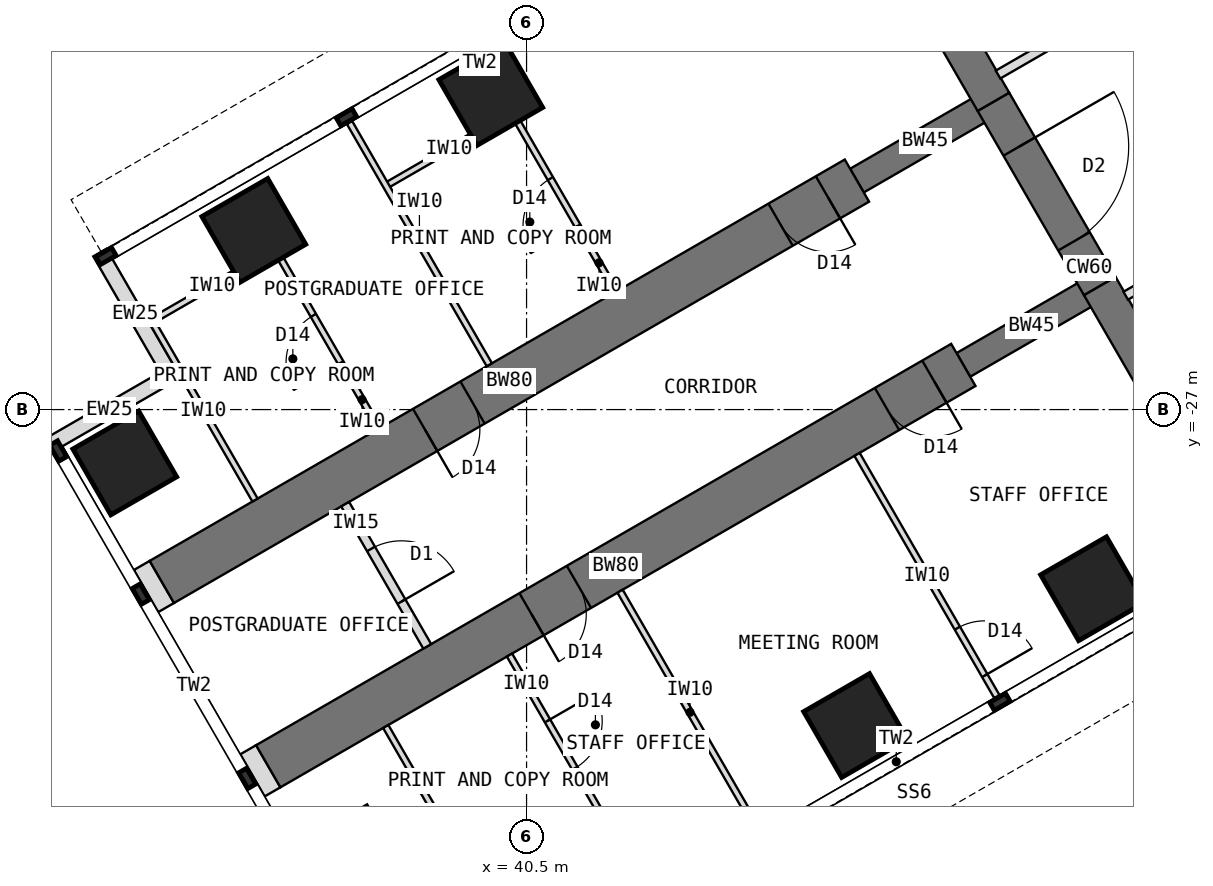
"""IFC4 building model, lengths in metres.
Left out: names, types, materials, properties, quantities, classifications, styles, units other than length and angle.
Written with IfcOpenShell. Run it as: python <this file> out.ifc"""

import sys

from ifc_helpers import new_model, si_unit, direction, frame, frame_2d, origin, origin_2d, place, context, subcontext, project, spatial, rectangle, extrude, element, fill, save


model = new_model("IFC4")
c1 = context("Model", 3, precision=1e-05, world=origin(), true_north=direction((0.0, 1.0)))
c2 = subcontext(c1, "Body", "Model", "MODEL_VIEW")
j1 = project(units=[si_unit("LENGTHUNIT", "METRE"), si_unit("PLANEANGLEUNIT", "RADIAN")], contexts=[c1])
p1 = place(None, origin())
s1 = spatial("IfcSite", under=j1, at=p1, CompositionType="ELEMENT")
p2 = place(p1, origin())
s2 = spatial("IfcBuilding", under=s1, at=p2, CompositionType="ELEMENT")
p3 = place(p2, frame((0.0, 0.0, 157.5)))
s3 = spatial("IfcBuildingStorey", under=s2, at=p3, CompositionType="ELEMENT", Elevation=157.5)
p4 = place(p3, frame((45.904, -18.0, 0.0), z_axis=(0.0, 0.0, 1.0), x_axis=(0.500024481964, -0.866011268655, 0.0)))
e1 = element("IfcWall", 1, at=p4, inside=s3, PredefinedType="SHEAR", context=c2, shape_type="SweptSolid", body=[
    extrude(rectangle(XDim=4.548, YDim=0.6, at=frame_2d((2.274, 0.0))), origin(), (0.0, 0.0, 1.0), 4.0),
])
p5 = place(p3, frame((48.178, -21.939, 0.0), z_axis=(0.0, 0.0, 1.0), x_axis=(0.500010275428, -0.866019471182, 0.0)))
e2 = element("IfcWall", 2, at=p5, inside=s3, PredefinedType="SHEAR", context=c2, shape_type="SweptSolid", body=[
    extrude(rectangle(XDim=3.5, YDim=0.6, at=frame_2d((1.75, 0.0))), origin(), (0.0, 0.0, 1.0), 4.0),
])
p6 = place(p5, frame((0.85, 0.0, 0.0)))
e3 = element("IfcOpeningElement", 3, at=p6, cuts=e2, PredefinedType="OPENING", context=c2, shape_type="SweptSolid", body=[
    extrude(rectangle(XDim=1.8, YDim=2.1, at=frame_2d((0.9, 1.05))), frame((0.0, 0.31, 0.0), z_axis=(0.0, -1.0, 0.0), x_axis=(1.0, 0.0, 0.0)), (0.0, 0.0, 1.0), 0.62),
])
p7 = place(p3, frame((49.928, -24.97, 0.0), z_axis=(0.0, 0.0, 1.0), x_axis=(0.499984222037, -0.866034513004, 0.0)))
e4 = element("IfcWall", 4, at=p7, inside=s3, PredefinedType="SHEAR", context=c2, shape_type="SweptSolid", body=[
    extrude(rectangle(XDim=4.548, YDim=0.6, at=frame_2d((2.274, 0.0))), origin(), (0.0, 0.0, 1.0), 4.0),
])
p8 = place(p3, frame((49.928, -24.97, 0.0), z_axis=(0.0, 0.0, 1.0), x_axis=(-0.866031863473, -0.499988811324, 0.0)))
e5 = element("IfcWall", 5, at=p8, inside=s3, PredefinedType="SHEAR", context=c2, shape_type="SweptSolid", body=[
    extrude(rectangle(XDim=2.592, YDim=0.45, at=frame_2d((1.296, 0.0))), origin(), (0.0, 0.0, 1.0), 4.0),
])
p9 = place(p3, frame((47.684, -26.266, 0.0), z_axis=(0.0, 0.0, 1.0), x_axis=(-0.866027579429, -0.499996231654, 0.0)))
e6 = element("IfcWall", 6, at=p9, inside=s3, PredefinedType="SHEAR", context=c2, shape_type="SweptSolid", body=[
    extrude(rectangle(XDim=13.2, YDim=0.8, at=frame_2d((6.6, 0.0))), origin(), (0.0, 0.0, 1.0), 4.0),
])
p10 = place(p9, frame((0.55, 0.0, 0.0)))
e7 = element("IfcOpeningElement", 7, at=p10, cuts=e6, PredefinedType="OPENING", context=c2, shape_type="SweptSolid", body=[
    extrude(rectangle(XDim=0.9, YDim=2.1, at=frame_2d((0.45, 1.05))), frame((0.0, 0.41, 0.0), z_axis=(0.0, -1.0, 0.0), x_axis=(1.0, 0.0, 0.0)), (0.0, 0.0, 1.0), 0.82),
])
p11 = place(p9, frame((7.3, 0.0, 0.0)))
e8 = element("IfcOpeningElement", 8, at=p11, cuts=e6, PredefinedType="OPENING", context=c2, shape_type="SweptSolid", body=[
    extrude(rectangle(XDim=0.9, YDim=2.1, at=frame_2d((0.45, 1.05))), frame((0.0, 0.41, 0.0), z_axis=(0.0, -1.0, 0.0), x_axis=(1.0, 0.0, 0.0)), (0.0, 0.0, 1.0), 0.82),
])
p12 = place(p3, frame((48.178, -21.939, 0.0), z_axis=(0.0, 0.0, 1.0), x_axis=(-0.866072649678, -0.499918158782, 0.0)))
e9 = element("IfcWall", 9, at=p12, inside=s3, PredefinedType="SHEAR", context=c2, shape_type="SweptSolid", body=[
    extrude(rectangle(XDim=2.592, YDim=0.45, at=frame_2d((1.296, 0.0))), origin(), (0.0, 0.0, 1.0), 4.0),
])
p13 = place(p3, frame((45.934, -23.234, 0.0), z_axis=(0.0, 0.0, 1.0), x_axis=(-0.866019570528, -0.500010103361, 0.0)))
e10 = element("IfcWall", 10, at=p13, inside=s3, PredefinedType="SHEAR", context=c2, shape_type="SweptSolid", body=[
    extrude(rectangle(XDim=13.2, YDim=0.8, at=frame_2d((6.6, 0.0))), origin(), (0.0, 0.0, 1.0), 4.0),
])
p14 = place(p13, frame((0.55, 0.0, 0.0)))
e11 = element("IfcOpeningElement", 11, at=p14, cuts=e10, PredefinedType="OPENING", context=c2, shape_type="SweptSolid", body=[
    extrude(rectangle(XDim=0.9, YDim=2.1, at=frame_2d((0.45, 1.05))), frame((0.0, 0.41, 0.0), z_axis=(0.0, -1.0, 0.0), x_axis=(1.0, 0.0, 0.0)), (0.0, 0.0, 1.0), 0.82),
])
p15 = place(p13, frame((7.3, 0.0, 0.0)))
e12 = element("IfcOpeningElement", 12, at=p15, cuts=e10, PredefinedType="OPENING", context=c2, shape_type="SweptSolid", body=[
    extrude(rectangle(XDim=0.9, YDim=2.1, at=frame_2d((0.45, 1.05))), frame((0.0, 0.41, 0.0), z_axis=(0.0, -1.0, 0.0), x_axis=(1.0, 0.0, 0.0)), (0.0, 0.0, 1.0), 0.82),
])
for number, where, z_axis, x_axis in (
    (13, (49.809, -29.946, 0.0), (0.0, 0.0, 1.0), (0.866, 0.5, 0.0)),
    (14, (45.912, -32.196, 0.0), (0.0, 0.0, 1.0), (0.866, 0.5, 0.0)),
    (15, (39.912, -21.804, 0.0), (0.0, 0.0, 1.0), (0.866, 0.5, 0.0)),
    (16, (36.014, -24.054, 0.0), (0.0, 0.0, 1.0), (0.866, 0.5, 0.0)),
    (17, (37.642, -34.373, 0.0), (0.0, 0.0, 1.0), (0.866, 0.5, 0.0)),
    (18, (33.892, -27.877, 0.0), (0.0, 0.0, 1.0), (0.866, 0.5, 0.0)),
):
    element("IfcColumn", number, at=place(p3, frame(where, z_axis=z_axis, x_axis=x_axis)), inside=s3, PredefinedType="COLUMN", context=c2, shape_type="SweptSolid", body=[
        extrude(rectangle(XDim=1.25, YDim=1.25, at=origin_2d()), origin(), (0.0, 0.0, 1.0), 4.0),
    ])
for number, where, z_axis, x_axis in (
    (19, (33.483, -24.419, 0.0), (0.0, 0.0, 1.0), (0.5, -0.866, 0.0)),
    (20, (34.645, -26.432, 0.0), (0.0, 0.0, 1.0), (-0.866, -0.5, 0.0)),
):
    element("IfcWall", number, at=place(p3, frame(where, z_axis=z_axis, x_axis=x_axis)), inside=s3, PredefinedType="STANDARD", context=c2, shape_type="SweptSolid", body=[
        extrude(rectangle(XDim=2.325, YDim=0.25, at=frame_2d((1.163, 0.0))), origin(), (0.0, 0.0, 1.0), 3.8),
    ])
p16 = place(p3, frame((36.252, -32.865, 0.0), z_axis=(0.0, 0.0, 1.0), x_axis=(-0.865778900179, -0.500426713919, 0.0)))
e21 = element("IfcWall", 21, at=p16, inside=s3, PredefinedType="PARTITIONING", context=c2, shape_type="SweptSolid", body=[
    extrude(rectangle(XDim=0.3, YDim=0.8, at=frame_2d((0.15, 0.0))), origin(), (0.0, 0.0, 1.0), 3.8),
])
p17 = place(p3, frame((34.502, -29.834, 0.0), z_axis=(0.0, 0.0, 1.0), x_axis=(-0.866131372301, -0.499816412211, 0.0)))
e22 = element("IfcWall", 22, at=p17, inside=s3, PredefinedType="PARTITIONING", context=c2, shape_type="SweptSolid", body=[
    extrude(rectangle(XDim=0.3, YDim=0.8, at=frame_2d((0.15, 0.0))), origin(), (0.0, 0.0, 1.0), 3.8),
])
p18 = place(p3, frame((45.935, -27.737, 0.0), z_axis=(0.0, 0.0, 1.0), x_axis=(0.500014953309, -0.866016770315, 0.0)))
e23 = element("IfcWall", 23, at=p18, inside=s3, PredefinedType="PARTITIONING", context=c2, shape_type="SweptSolid", body=[
    extrude(rectangle(XDim=4.6, YDim=0.1, at=frame_2d((2.3, 0.0))), origin(), (0.0, 0.0, 1.0), 3.8),
])
p19 = place(p18, frame((3.3, 0.0, 0.0)))
e24 = element("IfcOpeningElement", 24, at=p19, cuts=e23, PredefinedType="OPENING", context=c2, shape_type="SweptSolid", body=[
    extrude(rectangle(XDim=0.9, YDim=2.1, at=frame_2d((0.45, 1.05))), frame((0.0, 0.06, 0.0), z_axis=(0.0, -1.0, 0.0), x_axis=(1.0, 0.0, 0.0)), (0.0, 0.0, 1.0), 0.12),
])
p20 = place(p3, frame((42.038, -29.987, 0.0), z_axis=(0.0, 0.0, 1.0), x_axis=(0.499975146636, -0.866039752405, 0.0)))
e25 = element("IfcWall", 25, at=p20, inside=s3, PredefinedType="PARTITIONING", context=c2, shape_type="SweptSolid", body=[
    extrude(rectangle(XDim=4.6, YDim=0.1, at=frame_2d((2.3, 0.0))), origin(), (0.0, 0.0, 1.0), 3.8),
])
p21 = place(p3, frame((40.219, -31.037, 0.0), z_axis=(0.0, 0.0, 1.0), x_axis=(0.500031147688, -0.866007419912, 0.0)))
e26 = element("IfcWall", 26, at=p21, inside=s3, PredefinedType="PARTITIONING", context=c2, shape_type="SweptSolid", body=[
    extrude(rectangle(XDim=3.4, YDim=0.1, at=frame_2d((1.7, 0.0))), origin(), (0.0, 0.0, 1.0), 3.8),
])
p22 = place(p21, frame((1.25, 0.0, 0.0)))
e27 = element("IfcOpeningElement", 27, at=p22, cuts=e26, PredefinedType="OPENING", context=c2, shape_type="SweptSolid", body=[
    extrude(rectangle(XDim=0.9, YDim=2.1, at=frame_2d((0.45, 1.05))), frame((0.0, 0.06, 0.0), z_axis=(0.0, -1.0, 0.0), x_axis=(1.0, 0.0, 0.0)), (0.0, 0.0, 1.0), 0.12),
])
p23 = place(p3, frame((38.184, -32.212, 0.0), z_axis=(0.0, 0.0, 1.0), x_axis=(0.500031147688, -0.866007419912, 0.0)))
e28 = element("IfcWall", 28, at=p23, inside=s3, PredefinedType="PARTITIONING", context=c2, shape_type="SweptSolid", body=[
    extrude(rectangle(XDim=3.4, YDim=0.1, at=frame_2d((1.7, 0.0))), origin(), (0.0, 0.0, 1.0), 3.8),
])
p24 = place(p3, frame((39.888, -26.263, 0.0), z_axis=(0.0, 0.0, 1.0), x_axis=(-0.500014953309, 0.866016770315, 0.0)))
e29 = element("IfcWall", 29, at=p24, inside=s3, PredefinedType="PARTITIONING", context=c2, shape_type="SweptSolid", body=[
    extrude(rectangle(XDim=4.6, YDim=0.1, at=frame_2d((2.3, 0.0))), origin(), (0.0, 0.0, 1.0), 3.8),
])
p25 = place(p3, frame((40.266, -22.119, 0.0), z_axis=(0.0, 0.0, 1.0), x_axis=(-0.866024647952, -0.500001309137, 0.0)))
e30 = element("IfcWall", 30, at=p25, inside=s3, PredefinedType="PARTITIONING", context=c2, shape_type="SweptSolid", body=[
    extrude(rectangle(XDim=2.4, YDim=0.1, at=frame_2d((1.2, 0.0))), origin(), (0.0, 0.0, 1.0), 3.8),
])
p26 = place(p3, frame((41.967, -25.063, 0.0), z_axis=(0.0, 0.0, 1.0), x_axis=(-0.500062241894, 0.865989465428, 0.0)))
e31 = element("IfcWall", 31, at=p26, inside=s3, PredefinedType="PARTITIONING", context=c2, shape_type="SweptSolid", body=[
    extrude(rectangle(XDim=3.4, YDim=0.1, at=frame_2d((1.7, 0.0))), origin(), (0.0, 0.0, 1.0), 3.8),
])
p27 = place(p26, frame((1.25, 0.0, 0.0)))
e32 = element("IfcOpeningElement", 32, at=p27, cuts=e31, PredefinedType="OPENING", context=c2, shape_type="SweptSolid", body=[
    extrude(rectangle(XDim=0.9, YDim=2.1, at=frame_2d((0.45, 1.05))), frame((0.0, 0.06, 0.0), z_axis=(0.0, -1.0, 0.0), x_axis=(1.0, 0.0, 0.0)), (0.0, 0.0, 1.0), 0.12),
])
p28 = place(p3, frame((36.369, -24.369, 0.0), z_axis=(0.0, 0.0, 1.0), x_axis=(-0.866050077142, -0.499957262057, 0.0)))
e33 = element("IfcWall", 33, at=p28, inside=s3, PredefinedType="PARTITIONING", context=c2, shape_type="SweptSolid", body=[
    extrude(rectangle(XDim=2.4, YDim=0.1, at=frame_2d((1.2, 0.0))), origin(), (0.0, 0.0, 1.0), 3.8),
])
p29 = place(p3, frame((38.069, -27.313, 0.0), z_axis=(0.0, 0.0, 1.0), x_axis=(-0.500008388397, 0.866020560687, 0.0)))
e34 = element("IfcWall", 34, at=p29, inside=s3, PredefinedType="PARTITIONING", context=c2, shape_type="SweptSolid", body=[
    extrude(rectangle(XDim=3.4, YDim=0.1, at=frame_2d((1.7, 0.0))), origin(), (0.0, 0.0, 1.0), 3.8),
])
p30 = place(p29, frame((1.25, 0.0, 0.0)))
e35 = element("IfcOpeningElement", 35, at=p30, cuts=e34, PredefinedType="OPENING", context=c2, shape_type="SweptSolid", body=[
    extrude(rectangle(XDim=0.9, YDim=2.1, at=frame_2d((0.45, 1.05))), frame((0.0, 0.06, 0.0), z_axis=(0.0, -1.0, 0.0), x_axis=(1.0, 0.0, 0.0)), (0.0, 0.0, 1.0), 0.12),
])
p31 = place(p3, frame((36.034, -28.488, 0.0), z_axis=(0.0, 0.0, 1.0), x_axis=(-0.499977295307, 0.866038511948, 0.0)))
e36 = element("IfcWall", 36, at=p31, inside=s3, PredefinedType="PARTITIONING", context=c2, shape_type="SweptSolid", body=[
    extrude(rectangle(XDim=3.4, YDim=0.1, at=frame_2d((1.7, 0.0))), origin(), (0.0, 0.0, 1.0), 3.8),
])
p32 = place(p3, frame((48.254, -21.49, 0.0), z_axis=(0.0, 0.0, 1.0), x_axis=(0.866025707867, 0.499999473313, 0.0)))
e37 = element("IfcWall", 37, at=p32, inside=s3, PredefinedType="PARTITIONING", context=c2, shape_type="SweptSolid", body=[
    extrude(rectangle(XDim=4.476, YDim=0.15, at=frame_2d((2.238, 0.0))), origin(), (0.0, 0.0, 1.0), 3.8),
])
p33 = place(p32, frame((2.633, 0.0, 0.0)))
e38 = element("IfcOpeningElement", 38, at=p33, cuts=e37, PredefinedType="OPENING", context=c2, shape_type="SweptSolid", body=[
    extrude(rectangle(XDim=1.0, YDim=2.1, at=frame_2d((0.5, 1.05))), frame((0.0, 0.085, 0.0), z_axis=(0.0, -1.0, 0.0), x_axis=(1.0, 0.0, 0.0)), (0.0, 0.0, 1.0), 0.17),
])
p34 = place(p3, frame((54.23, -22.89, 0.0), z_axis=(0.0, 0.0, 1.0), x_axis=(-0.866025707867, -0.499999473313, 0.0)))
e39 = element("IfcWall", 39, at=p34, inside=s3, PredefinedType="PARTITIONING", context=c2, shape_type="SweptSolid", body=[
    extrude(rectangle(XDim=4.476, YDim=0.15, at=frame_2d((2.238, 0.0))), origin(), (0.0, 0.0, 1.0), 3.8),
])
p35 = place(p34, frame((0.843, 0.0, 0.0)))
e40 = element("IfcOpeningElement", 40, at=p35, cuts=e39, PredefinedType="OPENING", context=c2, shape_type="SweptSolid", body=[
    extrude(rectangle(XDim=1.0, YDim=2.1, at=frame_2d((0.5, 1.05))), frame((0.0, 0.085, 0.0), z_axis=(0.0, -1.0, 0.0), x_axis=(1.0, 0.0, 0.0)), (0.0, 0.0, 1.0), 0.17),
])
p36 = place(p3, frame((37.517, -28.556, 0.0), z_axis=(0.0, 0.0, 1.0), x_axis=(0.500048589285, -0.86599734893, 0.0)))
e41 = element("IfcWall", 41, at=p36, inside=s3, PredefinedType="PARTITIONING", context=c2, shape_type="SweptSolid", body=[
    extrude(rectangle(XDim=2.7, YDim=0.15, at=frame_2d((1.35, 0.0))), origin(), (0.0, 0.0, 1.0), 3.8),
])
p37 = place(p36, frame((0.85, 0.0, 0.0)))
e42 = element("IfcOpeningElement", 42, at=p37, cuts=e41, PredefinedType="OPENING", context=c2, shape_type="SweptSolid", body=[
    extrude(rectangle(XDim=1.0, YDim=2.1, at=frame_2d((0.5, 1.05))), frame((0.0, 0.085, 0.0), z_axis=(0.0, -1.0, 0.0), x_axis=(1.0, 0.0, 0.0)), (0.0, 0.0, 1.0), 0.17),
])
p38 = place(p6, origin())
e43 = element("IfcDoor", 43, at=p38, inside=s3, OperationType="DOUBLE_DOOR_DOUBLE_SWING", PredefinedType="DOOR", context=c2, shape_type="SweptSolid", body=[
    extrude(rectangle(XDim=1.72, YDim=2.06, at=frame_2d((0.9, 1.03))), frame((0.0, 0.025, 0.0), z_axis=(0.0, -1.0, 0.0), x_axis=(1.0, 0.0, 0.0)), (0.0, 0.0, 1.0), 0.05),
    extrude(rectangle(XDim=0.04, YDim=2.1, at=frame_2d((0.02, 1.05))), frame((0.0, 0.3, 0.0), z_axis=(0.0, -1.0, 0.0), x_axis=(1.0, 0.0, 0.0)), (0.0, 0.0, 1.0), 0.6),
    extrude(rectangle(XDim=0.04, YDim=2.1, at=frame_2d((1.78, 1.05))), frame((0.0, 0.3, 0.0), z_axis=(0.0, -1.0, 0.0), x_axis=(1.0, 0.0, 0.0)), (0.0, 0.0, 1.0), 0.6),
    extrude(rectangle(XDim=1.72, YDim=0.04, at=frame_2d((0.9, 2.08))), frame((0.0, 0.3, 0.0), z_axis=(0.0, -1.0, 0.0), x_axis=(1.0, 0.0, 0.0)), (0.0, 0.0, 1.0), 0.6),
])
fill(e3, e43)
p39 = place(p19, origin())
e44 = element("IfcDoor", 44, at=p39, inside=s3, OperationType="SINGLE_SWING_RIGHT", PredefinedType="DOOR", context=c2, shape_type="SweptSolid", body=[
    extrude(rectangle(XDim=0.9, YDim=2.1, at=frame_2d((0.45, 1.05))), frame((0.0, 0.025, 0.0), z_axis=(0.0, -1.0, 0.0), x_axis=(1.0, 0.0, 0.0)), (0.0, 0.0, 1.0), 0.05),
])
fill(e24, e44)
p40 = place(p22, origin())
e45 = element("IfcDoor", 45, at=p40, inside=s3, OperationType="SINGLE_SWING_LEFT", PredefinedType="DOOR", context=c2, shape_type="SweptSolid", body=[
    extrude(rectangle(XDim=0.9, YDim=2.1, at=frame_2d((0.45, 1.05))), frame((0.0, 0.025, 0.0), z_axis=(0.0, -1.0, 0.0), x_axis=(1.0, 0.0, 0.0)), (0.0, 0.0, 1.0), 0.05),
])
fill(e27, e45)
p41 = place(p27, origin())
e46 = element("IfcDoor", 46, at=p41, inside=s3, OperationType="SINGLE_SWING_LEFT", PredefinedType="DOOR", context=c2, shape_type="SweptSolid", body=[
    extrude(rectangle(XDim=0.9, YDim=2.1, at=frame_2d((0.45, 1.05))), frame((0.0, 0.025, 0.0), z_axis=(0.0, -1.0, 0.0), x_axis=(1.0, 0.0, 0.0)), (0.0, 0.0, 1.0), 0.05),
])
fill(e32, e46)
p42 = place(p30, origin())
e47 = element("IfcDoor", 47, at=p42, inside=s3, OperationType="SINGLE_SWING_LEFT", PredefinedType="DOOR", context=c2, shape_type="SweptSolid", body=[
    extrude(rectangle(XDim=0.9, YDim=2.1, at=frame_2d((0.45, 1.05))), frame((0.0, 0.025, 0.0), z_axis=(0.0, -1.0, 0.0), x_axis=(1.0, 0.0, 0.0)), (0.0, 0.0, 1.0), 0.05),
])
fill(e35, e47)
p43 = place(p37, origin())
e48 = element("IfcDoor", 48, at=p43, inside=s3, OperationType="SINGLE_SWING_RIGHT", PredefinedType="DOOR", context=c2, shape_type="SweptSolid", body=[
    extrude(rectangle(XDim=1.0, YDim=2.1, at=frame_2d((0.5, 1.05))), frame((0.0, 0.025, 0.0), z_axis=(0.0, -1.0, 0.0), x_axis=(1.0, 0.0, 0.0)), (0.0, 0.0, 1.0), 0.05),
])
fill(e42, e48)
p44 = place(p10, origin())
e49 = element("IfcDoor", 49, at=p44, inside=s3, OperationType="SINGLE_SWING_LEFT", PredefinedType="DOOR", context=c2, shape_type="SweptSolid", body=[
    extrude(rectangle(XDim=0.82, YDim=2.06, at=frame_2d((0.45, 1.03))), frame((0.0, 0.025, 0.0), z_axis=(0.0, -1.0, 0.0), x_axis=(1.0, 0.0, 0.0)), (0.0, 0.0, 1.0), 0.05),
    extrude(rectangle(XDim=0.04, YDim=2.1, at=frame_2d((0.02, 1.05))), frame((0.0, 0.4, 0.0), z_axis=(0.0, -1.0, 0.0), x_axis=(1.0, 0.0, 0.0)), (0.0, 0.0, 1.0), 0.8),
    extrude(rectangle(XDim=0.04, YDim=2.1, at=frame_2d((0.88, 1.05))), frame((0.0, 0.4, 0.0), z_axis=(0.0, -1.0, 0.0), x_axis=(1.0, 0.0, 0.0)), (0.0, 0.0, 1.0), 0.8),
    extrude(rectangle(XDim=0.82, YDim=0.04, at=frame_2d((0.45, 2.08))), frame((0.0, 0.4, 0.0), z_axis=(0.0, -1.0, 0.0), x_axis=(1.0, 0.0, 0.0)), (0.0, 0.0, 1.0), 0.8),
])
fill(e7, e49)
p45 = place(p11, origin())
e50 = element("IfcDoor", 50, at=p45, inside=s3, OperationType="SINGLE_SWING_RIGHT", PredefinedType="DOOR", context=c2, shape_type="SweptSolid", body=[
    extrude(rectangle(XDim=0.82, YDim=2.06, at=frame_2d((0.45, 1.03))), frame((0.0, 0.025, 0.0), z_axis=(0.0, -1.0, 0.0), x_axis=(1.0, 0.0, 0.0)), (0.0, 0.0, 1.0), 0.05),
    extrude(rectangle(XDim=0.04, YDim=2.1, at=frame_2d((0.02, 1.05))), frame((0.0, 0.4, 0.0), z_axis=(0.0, -1.0, 0.0), x_axis=(1.0, 0.0, 0.0)), (0.0, 0.0, 1.0), 0.8),
    extrude(rectangle(XDim=0.04, YDim=2.1, at=frame_2d((0.88, 1.05))), frame((0.0, 0.4, 0.0), z_axis=(0.0, -1.0, 0.0), x_axis=(1.0, 0.0, 0.0)), (0.0, 0.0, 1.0), 0.8),
    extrude(rectangle(XDim=0.82, YDim=0.04, at=frame_2d((0.45, 2.08))), frame((0.0, 0.4, 0.0), z_axis=(0.0, -1.0, 0.0), x_axis=(1.0, 0.0, 0.0)), (0.0, 0.0, 1.0), 0.8),
])
fill(e8, e50)
p46 = place(p14, origin())
e51 = element("IfcDoor", 51, at=p46, inside=s3, OperationType="SINGLE_SWING_LEFT", PredefinedType="DOOR", context=c2, shape_type="SweptSolid", body=[
    extrude(rectangle(XDim=0.82, YDim=2.06, at=frame_2d((0.45, 1.03))), frame((0.0, 0.025, 0.0), z_axis=(0.0, -1.0, 0.0), x_axis=(1.0, 0.0, 0.0)), (0.0, 0.0, 1.0), 0.05),
    extrude(rectangle(XDim=0.04, YDim=2.1, at=frame_2d((0.02, 1.05))), frame((0.0, 0.4, 0.0), z_axis=(0.0, -1.0, 0.0), x_axis=(1.0, 0.0, 0.0)), (0.0, 0.0, 1.0), 0.8),
    extrude(rectangle(XDim=0.04, YDim=2.1, at=frame_2d((0.88, 1.05))), frame((0.0, 0.4, 0.0), z_axis=(0.0, -1.0, 0.0), x_axis=(1.0, 0.0, 0.0)), (0.0, 0.0, 1.0), 0.8),
    extrude(rectangle(XDim=0.82, YDim=0.04, at=frame_2d((0.45, 2.08))), frame((0.0, 0.4, 0.0), z_axis=(0.0, -1.0, 0.0), x_axis=(1.0, 0.0, 0.0)), (0.0, 0.0, 1.0), 0.8),
])
fill(e11, e51)
p47 = place(p15, origin())
e52 = element("IfcDoor", 52, at=p47, inside=s3, OperationType="SINGLE_SWING_RIGHT", PredefinedType="DOOR", context=c2, shape_type="SweptSolid", body=[
    extrude(rectangle(XDim=0.82, YDim=2.06, at=frame_2d((0.45, 1.03))), frame((0.0, 0.025, 0.0), z_axis=(0.0, -1.0, 0.0), x_axis=(1.0, 0.0, 0.0)), (0.0, 0.0, 1.0), 0.05),
    extrude(rectangle(XDim=0.04, YDim=2.1, at=frame_2d((0.02, 1.05))), frame((0.0, 0.4, 0.0), z_axis=(0.0, -1.0, 0.0), x_axis=(1.0, 0.0, 0.0)), (0.0, 0.0, 1.0), 0.8),
    extrude(rectangle(XDim=0.04, YDim=2.1, at=frame_2d((0.88, 1.05))), frame((0.0, 0.4, 0.0), z_axis=(0.0, -1.0, 0.0), x_axis=(1.0, 0.0, 0.0)), (0.0, 0.0, 1.0), 0.8),
    extrude(rectangle(XDim=0.82, YDim=0.04, at=frame_2d((0.45, 2.08))), frame((0.0, 0.4, 0.0), z_axis=(0.0, -1.0, 0.0), x_axis=(1.0, 0.0, 0.0)), (0.0, 0.0, 1.0), 0.8),
])
fill(e12, e52)
save(model, sys.argv[1])
